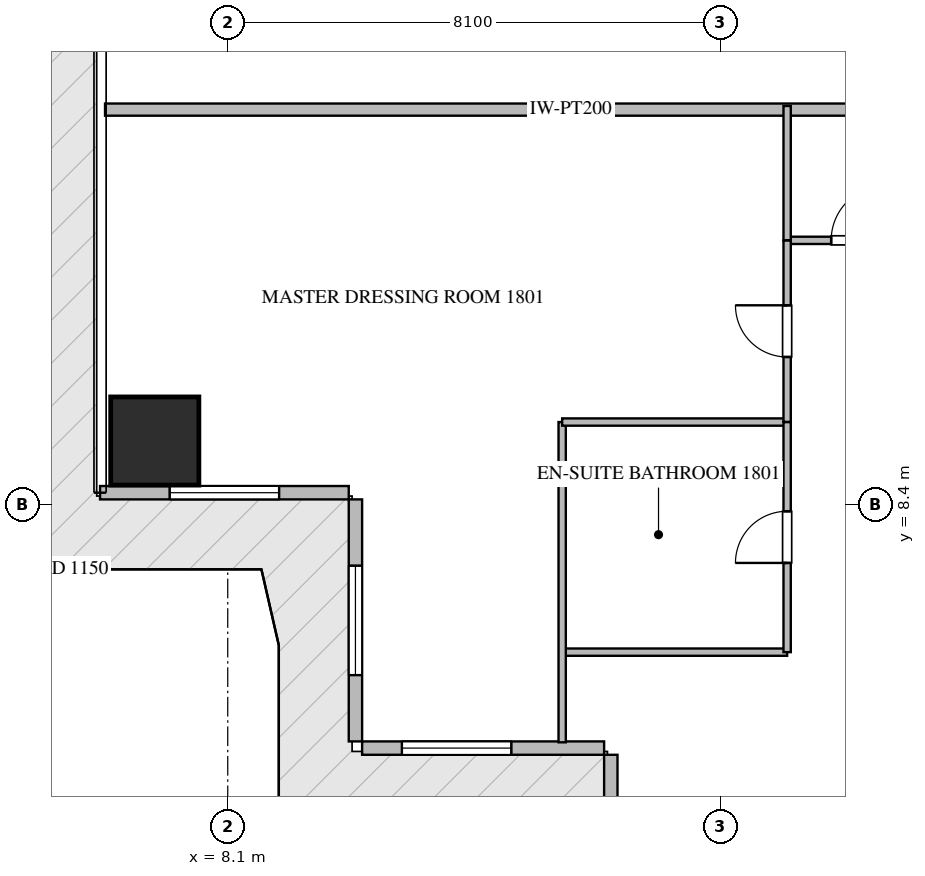
"""IFC4 building model, lengths in metres.
Left out: names, types, materials, properties, quantities, classifications, styles, units other than length and angle.
Written with IfcOpenShell. Run it as: python <this file> out.ifc"""

import sys

from ifc_helpers import new_model, si_unit, direction, frame, frame_2d, origin, origin_2d, place, context, subcontext, project, spatial, rectangle, extrude, source, transform, mapped, element, fill, save


model = new_model("IFC4")
c1 = context("Model", 3, precision=1e-05, world=origin(), true_north=direction((0.0, 1.0)))
c2 = subcontext(c1, "Body", "Model", "MODEL_VIEW")
j1 = project(units=[si_unit("LENGTHUNIT", "METRE"), si_unit("PLANEANGLEUNIT", "RADIAN")], contexts=[c1])
p1 = place(None, origin())
s1 = spatial("IfcSite", under=j1, at=p1, CompositionType="ELEMENT")
p2 = place(p1, origin())
s2 = spatial("IfcBuilding", under=s1, at=p2, CompositionType="ELEMENT")
p3 = place(p2, frame((0.0, 0.0, 75.45)))
s3 = spatial("IfcBuildingStorey", under=s2, at=p3, CompositionType="ELEMENT", Elevation=75.45)
m1 = source(origin(), c2, "Body", "SweptSolid", [
    extrude(rectangle(XDim=1.45, YDim=1.45, at=origin_2d()), origin(), (0.0, 0.0, 1.0), 3.75),
])
p4 = place(p3, frame((6.9, 9.45, -0.26), z_axis=(0.0, 0.0, 1.0), x_axis=(1.0, 0.0, 0.0)))
e1 = element("IfcColumn", 1, at=p4, inside=s3, PredefinedType="COLUMN", context=c2, shape_type="MappedRepresentation", body=[
    mapped(m1, transform((0.0, 0.0, 0.0), scale=1.0)),
])
p5 = place(p3, frame((6.0, 8.6, 0.0), z_axis=(0.0, 0.0, 1.0), x_axis=(1.0, 0.0, 0.0)))
e2 = element("IfcWall", 2, at=p5, inside=s3, PredefinedType="ELEMENTEDWALL", context=c2, shape_type="SweptSolid", body=[
    extrude(rectangle(XDim=4.09, YDim=0.22, at=frame_2d((2.045, 0.0))), origin(), (0.0, 0.0, 1.0), 3.475),
])
p6 = place(p5, frame((1.145, 0.0, 0.65)))
e3 = element("IfcOpeningElement", 3, at=p6, cuts=e2, PredefinedType="OPENING", context=c2, shape_type="SweptSolid", body=[
    extrude(rectangle(XDim=1.8, YDim=2.1, at=frame_2d((0.9, 1.05))), frame((0.0, 0.12, 0.0), z_axis=(0.0, -1.0, 0.0), x_axis=(1.0, 0.0, 0.0)), (0.0, 0.0, 1.0), 0.24),
])
p7 = place(p3, frame((10.2, 8.49, 0.0), z_axis=(0.0, 0.0, 1.0), x_axis=(0.0, -1.0, 0.0)))
e4 = element("IfcWall", 4, at=p7, inside=s3, PredefinedType="ELEMENTEDWALL", context=c2, shape_type="SweptSolid", body=[
    extrude(rectangle(XDim=3.98, YDim=0.22, at=frame_2d((1.99, 0.0))), origin(), (0.0, 0.0, 1.0), 3.475),
])
p8 = place(p7, frame((1.09, 0.0, 0.65)))
e5 = element("IfcOpeningElement", 5, at=p8, cuts=e4, PredefinedType="OPENING", context=c2, shape_type="SweptSolid", body=[
    extrude(rectangle(XDim=1.8, YDim=2.1, at=frame_2d((0.9, 1.05))), frame((0.0, 0.12, 0.0), z_axis=(0.0, -1.0, 0.0), x_axis=(1.0, 0.0, 0.0)), (0.0, 0.0, 1.0), 0.24),
])
p9 = place(p3, frame((10.31, 4.4, 0.0), z_axis=(0.0, 0.0, 1.0), x_axis=(1.0, 0.0, 0.0)))
e6 = element("IfcWall", 6, at=p9, inside=s3, PredefinedType="ELEMENTEDWALL", context=c2, shape_type="SweptSolid", body=[
    extrude(rectangle(XDim=3.98, YDim=0.22, at=frame_2d((1.99, 0.0))), origin(), (0.0, 0.0, 1.0), 3.475),
])
p10 = place(p9, frame((0.654, 0.0, 0.65)))
e7 = element("IfcOpeningElement", 7, at=p10, cuts=e6, PredefinedType="OPENING", context=c2, shape_type="SweptSolid", body=[
    extrude(rectangle(XDim=1.8, YDim=2.1, at=frame_2d((0.9, 1.05))), frame((0.0, 0.12, 0.0), z_axis=(0.0, -1.0, 0.0), x_axis=(1.0, 0.0, 0.0)), (0.0, 0.0, 1.0), 0.24),
])
p11 = place(p3, frame((14.4, 4.29, 0.0), z_axis=(0.0, 0.0, 1.0), x_axis=(0.0, -1.0, 0.0)))
e8 = element("IfcWall", 8, at=p11, inside=s3, PredefinedType="ELEMENTEDWALL", context=c2, shape_type="SweptSolid", body=[
    extrude(rectangle(XDim=4.09, YDim=0.22, at=frame_2d((2.045, 0.0))), origin(), (0.0, 0.0, 1.0), 3.475),
])
p12 = place(p11, frame((1.145, 0.0, 0.65)))
e9 = element("IfcOpeningElement", 9, at=p12, cuts=e8, PredefinedType="OPENING", context=c2, shape_type="SweptSolid", body=[
    extrude(rectangle(XDim=1.8, YDim=2.1, at=frame_2d((0.9, 1.05))), frame((0.0, 0.12, 0.0), z_axis=(0.0, -1.0, 0.0), x_axis=(1.0, 0.0, 0.0)), (0.0, 0.0, 1.0), 0.24),
])
p13 = place(p3, frame((6.082, 14.9, 0.0), z_axis=(0.0, 0.0, 1.0), x_axis=(1.0, 0.0, 0.0)))
e10 = element("IfcWall", 10, at=p13, inside=s3, PredefinedType="PARTITIONING", context=c2, shape_type="SweptSolid", body=[
    extrude(rectangle(XDim=15.318, YDim=0.2, at=frame_2d((7.659, 0.0))), origin(), (0.0, 0.0, 1.0), 3.49),
])
p14 = place(p3, frame((17.3, 12.75, 0.0), z_axis=(0.0, 0.0, 1.0), x_axis=(1.0, 0.0, 0.0)))
e11 = element("IfcWall", 11, at=p14, inside=s3, PredefinedType="PARTITIONING", context=c2, shape_type="SweptSolid", body=[
    extrude(rectangle(XDim=2.348, YDim=0.12, at=frame_2d((1.174, 0.0))), origin(), (0.0, 0.0, 1.0), 3.49),
])
p15 = place(p14, frame((0.724, 0.0, 0.0)))
e12 = element("IfcOpeningElement", 12, at=p15, cuts=e11, PredefinedType="OPENING", context=c2, shape_type="SweptSolid", body=[
    extrude(rectangle(XDim=0.9, YDim=2.1, at=frame_2d((0.45, 1.05))), frame((0.0, 0.07, 0.0), z_axis=(0.0, -1.0, 0.0), x_axis=(1.0, 0.0, 0.0)), (0.0, 0.0, 1.0), 0.14),
])
p16 = place(p3, frame((13.6, 5.978, 0.0), z_axis=(0.0, 0.0, 1.0), x_axis=(1.0, 0.0, 0.0)))
e13 = element("IfcWall", 13, at=p16, inside=s3, PredefinedType="PARTITIONING", context=c2, shape_type="SweptSolid", body=[
    extrude(rectangle(XDim=3.7, YDim=0.12, at=frame_2d((1.85, 0.0))), origin(), (0.0, 0.0, 1.0), 3.49),
])
p17 = place(p3, frame((13.6, 4.495, 0.0), z_axis=(0.0, 0.0, 1.0), x_axis=(0.0, 1.0, 0.0)))
e14 = element("IfcWall", 14, at=p17, inside=s3, PredefinedType="PARTITIONING", context=c2, shape_type="SweptSolid", body=[
    extrude(rectangle(XDim=5.267, YDim=0.12, at=frame_2d((2.633, 0.0))), origin(), (0.0, 0.0, 1.0), 3.49),
])
p18 = place(p3, frame((13.6, 9.762, 0.0), z_axis=(0.0, 0.0, 1.0), x_axis=(1.0, 0.0, 0.0)))
e15 = element("IfcWall", 15, at=p18, inside=s3, PredefinedType="PARTITIONING", context=c2, shape_type="SweptSolid", body=[
    extrude(rectangle(XDim=3.7, YDim=0.12, at=frame_2d((1.85, 0.0))), origin(), (0.0, 0.0, 1.0), 3.49),
])
p19 = place(p3, frame((17.3, 5.978, 0.0), z_axis=(0.0, 0.0, 1.0), x_axis=(0.0, 1.0, 0.0)))
e16 = element("IfcWall", 16, at=p19, inside=s3, PredefinedType="PARTITIONING", context=c2, shape_type="SweptSolid", body=[
    extrude(rectangle(XDim=3.784, YDim=0.12, at=frame_2d((1.892, 0.0))), origin(), (0.0, 0.0, 1.0), 3.49),
])
p20 = place(p19, frame((1.467, 0.0, 0.0)))
e17 = element("IfcOpeningElement", 17, at=p20, cuts=e16, PredefinedType="OPENING", context=c2, shape_type="SweptSolid", body=[
    extrude(rectangle(XDim=0.85, YDim=2.1, at=frame_2d((0.425, 1.05))), frame((0.0, 0.07, 0.0), z_axis=(0.0, -1.0, 0.0), x_axis=(1.0, 0.0, 0.0)), (0.0, 0.0, 1.0), 0.14),
])
p21 = place(p3, frame((17.3, 9.764, 0.0), z_axis=(0.0, 0.0, 1.0), x_axis=(0.0, 1.0, 0.0)))
e18 = element("IfcWall", 18, at=p21, inside=s3, PredefinedType="PARTITIONING", context=c2, shape_type="SweptSolid", body=[
    extrude(rectangle(XDim=2.986, YDim=0.12, at=frame_2d((1.493, 0.0))), origin(), (0.0, 0.0, 1.0), 3.49),
])
p22 = place(p21, frame((1.068, 0.0, 0.0)))
e19 = element("IfcOpeningElement", 19, at=p22, cuts=e18, PredefinedType="OPENING", context=c2, shape_type="SweptSolid", body=[
    extrude(rectangle(XDim=0.85, YDim=2.1, at=frame_2d((0.425, 1.05))), frame((0.0, 0.07, 0.0), z_axis=(0.0, -1.0, 0.0), x_axis=(1.0, 0.0, 0.0)), (0.0, 0.0, 1.0), 0.14),
])
p23 = place(p3, frame((17.3, 12.752, 0.0), z_axis=(0.0, 0.0, 1.0), x_axis=(0.0, 1.0, 0.0)))
e20 = element("IfcWall", 20, at=p23, inside=s3, PredefinedType="PARTITIONING", context=c2, shape_type="SweptSolid", body=[
    extrude(rectangle(XDim=2.208, YDim=0.12, at=frame_2d((1.104, 0.0))), origin(), (0.0, 0.0, 1.0), 3.49),
])
m2 = source(origin(), c2, "Body", "SweptSolid", [
    extrude(rectangle(XDim=1.8, YDim=2.1, at=frame_2d((0.9, 1.05))), frame((0.0, 0.03, 0.0), z_axis=(0.0, -1.0, 0.0), x_axis=(1.0, 0.0, 0.0)), (0.0, 0.0, 1.0), 0.06),
])
p24 = place(p6, origin())
e21 = element("IfcWindow", 21, at=p24, inside=s3, PartitioningType="SINGLE_PANEL", PredefinedType="WINDOW", context=c2, shape_type="MappedRepresentation", body=[
    mapped(m2, transform((0.0, 0.0, 0.0), scale=1.0)),
])
fill(e3, e21)
p25 = place(p8, origin())
e22 = element("IfcWindow", 22, at=p25, inside=s3, PartitioningType="SINGLE_PANEL", PredefinedType="WINDOW", context=c2, shape_type="MappedRepresentation", body=[
    mapped(m2, transform((0.0, 0.0, 0.0), scale=1.0)),
])
fill(e5, e22)
p26 = place(p10, origin())
e23 = element("IfcWindow", 23, at=p26, inside=s3, PartitioningType="SINGLE_PANEL", PredefinedType="WINDOW", context=c2, shape_type="MappedRepresentation", body=[
    mapped(m2, transform((0.0, 0.0, 0.0), scale=1.0)),
])
fill(e7, e23)
m3 = source(origin(), c2, "Body", "SweptSolid", [
    extrude(rectangle(XDim=0.9, YDim=2.1, at=frame_2d((0.45, 1.05))), frame((0.0, 0.025, 0.0), z_axis=(0.0, -1.0, 0.0), x_axis=(1.0, 0.0, 0.0)), (0.0, 0.0, 1.0), 0.05),
])
p27 = place(p15, origin())
e24 = element("IfcDoor", 24, at=p27, inside=s3, OperationType="SINGLE_SWING_RIGHT", PredefinedType="DOOR", context=c2, shape_type="MappedRepresentation", body=[
    mapped(m3, transform((0.0, 0.0, 0.0), scale=1.0)),
])
fill(e12, e24)
m4 = source(origin(), c2, "Body", "SweptSolid", [
    extrude(rectangle(XDim=0.85, YDim=2.1, at=frame_2d((0.425, 1.05))), frame((0.0, 0.025, 0.0), z_axis=(0.0, -1.0, 0.0), x_axis=(1.0, 0.0, 0.0)), (0.0, 0.0, 1.0), 0.05),
])
p28 = place(p20, origin())
e25 = element("IfcDoor", 25, at=p28, inside=s3, OperationType="SINGLE_SWING_LEFT", PredefinedType="DOOR", context=c2, shape_type="MappedRepresentation", body=[
    mapped(m4, transform((0.0, 0.0, 0.0), scale=1.0)),
])
fill(e17, e25)
p29 = place(p22, origin())
e26 = element("IfcDoor", 26, at=p29, inside=s3, OperationType="SINGLE_SWING_RIGHT", PredefinedType="DOOR", context=c2, shape_type="MappedRepresentation", body=[
    mapped(m4, transform((0.0, 0.0, 0.0), scale=1.0)),
])
fill(e19, e26)
save(model, sys.argv[1])
